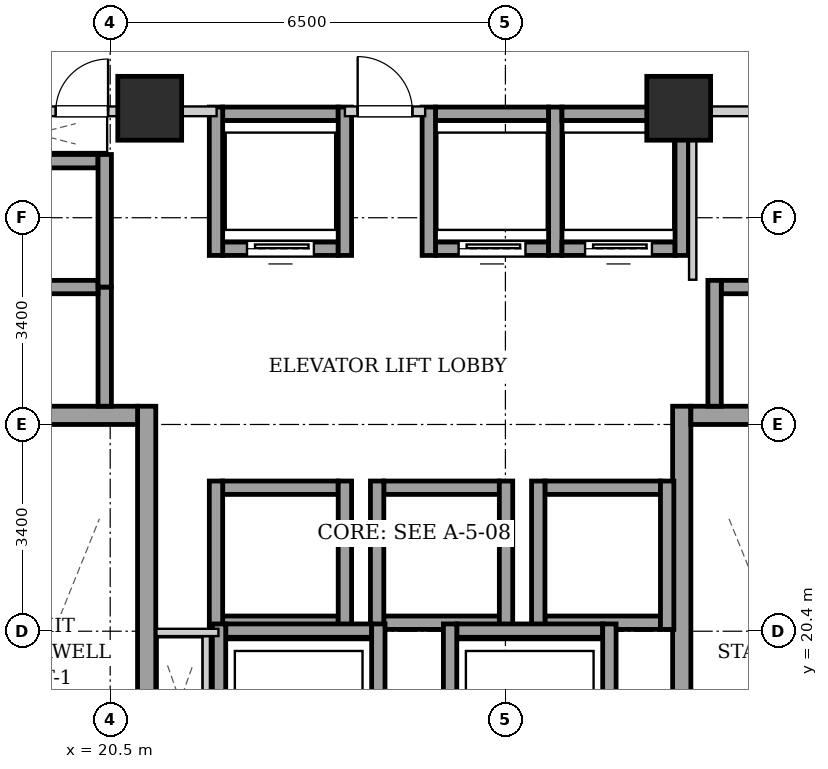
"""IFC4 building model, lengths in metres.
Left out: names, types, materials, properties, quantities, classifications, styles, units other than length and angle.
Written with IfcOpenShell. Run it as: python <this file> out.ifc"""

import sys

from ifc_helpers import new_model, si_unit, direction, frame, frame_2d, origin, origin_2d, place, context, subcontext, project, spatial, rectangle, extrude, element, fill, save


model = new_model("IFC4")
c1 = context("Model", 3, precision=1e-05, world=origin(), true_north=direction((0.0, 1.0)))
c2 = subcontext(c1, "Body", "Model", "MODEL_VIEW")
j1 = project(units=[si_unit("LENGTHUNIT", "METRE"), si_unit("PLANEANGLEUNIT", "RADIAN")], contexts=[c1])
p1 = place(None, origin())
s1 = spatial("IfcSite", under=j1, at=p1, CompositionType="ELEMENT")
p2 = place(p1, origin())
s2 = spatial("IfcBuilding", under=s1, at=p2, CompositionType="ELEMENT")
p3 = place(p2, frame((0.0, 0.0, 87.9)))
s3 = spatial("IfcBuildingStorey", under=s2, at=p3, CompositionType="ELEMENT", Elevation=87.9)
for number, where, z_axis, x_axis in (
    (1, (21.15, 29.0, 0.0), (0.0, 0.0, 1.0), (1.0, 0.0, 0.0)),
    (2, (29.85, 29.0, 0.0), (0.0, 0.0, 1.0), (1.0, 0.0, 0.0)),
):
    element("IfcColumn", number, at=place(p3, frame(where, z_axis=z_axis, x_axis=x_axis)), inside=s3, PredefinedType="COLUMN", context=c2, shape_type="SweptSolid", body=[
        extrude(rectangle(XDim=1.05, YDim=1.05, at=origin_2d()), origin(), (0.0, 0.0, 1.0), 3.2),
    ])
p4 = place(p3, frame((21.1, 15.1, 0.0), z_axis=(0.0, 0.0, 1.0), x_axis=(0.0, 1.0, 0.0)))
e3 = element("IfcWall", 3, at=p4, inside=s3, PredefinedType="SHEAR", context=c2, shape_type="SweptSolid", body=[
    extrude(rectangle(XDim=9.0, YDim=0.3, at=frame_2d((4.5, 0.0))), origin(), (0.0, 0.0, 1.0), 2.94),
])
p5 = place(p3, frame((18.1, 23.95, 0.0), z_axis=(0.0, 0.0, 1.0), x_axis=(1.0, 0.0, 0.0)))
e4 = element("IfcWall", 4, at=p5, inside=s3, PredefinedType="SHEAR", context=c2, shape_type="SweptSolid", body=[
    extrude(rectangle(XDim=2.85, YDim=0.3, at=frame_2d((1.425, 0.0))), origin(), (0.0, 0.0, 1.0), 2.94),
])
p6 = place(p3, frame((29.9, 15.1, 0.0), z_axis=(0.0, 0.0, 1.0), x_axis=(0.0, 1.0, 0.0)))
e5 = element("IfcWall", 5, at=p6, inside=s3, PredefinedType="SHEAR", context=c2, shape_type="SweptSolid", body=[
    extrude(rectangle(XDim=9.0, YDim=0.3, at=frame_2d((4.5, 0.0))), origin(), (0.0, 0.0, 1.0), 2.94),
])
p7 = place(p3, frame((30.05, 23.95, 0.0), z_axis=(0.0, 0.0, 1.0), x_axis=(1.0, 0.0, 0.0)))
e6 = element("IfcWall", 6, at=p7, inside=s3, PredefinedType="SHEAR", context=c2, shape_type="SweptSolid", body=[
    extrude(rectangle(XDim=2.85, YDim=0.3, at=frame_2d((1.425, 0.0))), origin(), (0.0, 0.0, 1.0), 2.94),
])
p8 = place(p3, frame((22.35, 26.69, 0.0), z_axis=(0.0, 0.0, 1.0), x_axis=(1.0, 0.0, 0.0)))
e7 = element("IfcWall", 7, at=p8, inside=s3, PredefinedType="SHEAR", context=c2, shape_type="SweptSolid", body=[
    extrude(rectangle(XDim=1.9, YDim=0.22, at=frame_2d((0.95, 0.0))), origin(), (0.0, 0.0, 1.0), 2.94),
])
p9 = place(p8, frame((0.4, 0.0, 0.0)))
e8 = element("IfcOpeningElement", 8, at=p9, cuts=e7, PredefinedType="OPENING", context=c2, shape_type="SweptSolid", body=[
    extrude(rectangle(XDim=1.1, YDim=2.15, at=frame_2d((0.55, 1.075))), frame((0.0, 0.12, 0.0), z_axis=(0.0, -1.0, 0.0), x_axis=(1.0, 0.0, 0.0)), (0.0, 0.0, 1.0), 0.24),
])
p10 = place(p3, frame((22.35, 28.91, 0.0), z_axis=(0.0, 0.0, 1.0), x_axis=(1.0, 0.0, 0.0)))
e9 = element("IfcWall", 9, at=p10, inside=s3, PredefinedType="SHEAR", context=c2, shape_type="SweptSolid", body=[
    extrude(rectangle(XDim=1.9, YDim=0.22, at=frame_2d((0.95, 0.0))), origin(), (0.0, 0.0, 1.0), 2.94),
])
for number, where, z_axis, x_axis in (
    (10, (22.24, 26.58, 0.0), (0.0, 0.0, 1.0), (0.0, 1.0, 0.0)),
    (11, (24.36, 26.58, 0.0), (0.0, 0.0, 1.0), (0.0, 1.0, 0.0)),
):
    element("IfcWall", number, at=place(p3, frame(where, z_axis=z_axis, x_axis=x_axis)), inside=s3, PredefinedType="SHEAR", context=c2, shape_type="SweptSolid", body=[
        extrude(rectangle(XDim=2.44, YDim=0.22, at=frame_2d((1.22, 0.0))), origin(), (0.0, 0.0, 1.0), 2.94),
    ])
p11 = place(p3, frame((25.85, 26.69, 0.0), z_axis=(0.0, 0.0, 1.0), x_axis=(1.0, 0.0, 0.0)))
e12 = element("IfcWall", 12, at=p11, inside=s3, PredefinedType="SHEAR", context=c2, shape_type="SweptSolid", body=[
    extrude(rectangle(XDim=1.86, YDim=0.22, at=frame_2d((0.93, 0.0))), origin(), (0.0, 0.0, 1.0), 2.94),
])
p12 = place(p11, frame((0.38, 0.0, 0.0)))
e13 = element("IfcOpeningElement", 13, at=p12, cuts=e12, PredefinedType="OPENING", context=c2, shape_type="SweptSolid", body=[
    extrude(rectangle(XDim=1.1, YDim=2.15, at=frame_2d((0.55, 1.075))), frame((0.0, 0.12, 0.0), z_axis=(0.0, -1.0, 0.0), x_axis=(1.0, 0.0, 0.0)), (0.0, 0.0, 1.0), 0.24),
])
p13 = place(p3, frame((25.85, 28.91, 0.0), z_axis=(0.0, 0.0, 1.0), x_axis=(1.0, 0.0, 0.0)))
e14 = element("IfcWall", 14, at=p13, inside=s3, PredefinedType="SHEAR", context=c2, shape_type="SweptSolid", body=[
    extrude(rectangle(XDim=1.86, YDim=0.22, at=frame_2d((0.93, 0.0))), origin(), (0.0, 0.0, 1.0), 2.94),
])
for number, where, z_axis, x_axis in (
    (15, (25.74, 26.58, 0.0), (0.0, 0.0, 1.0), (0.0, 1.0, 0.0)),
    (16, (27.82, 26.58, 0.0), (0.0, 0.0, 1.0), (0.0, 1.0, 0.0)),
):
    element("IfcWall", number, at=place(p3, frame(where, z_axis=z_axis, x_axis=x_axis)), inside=s3, PredefinedType="SHEAR", context=c2, shape_type="SweptSolid", body=[
        extrude(rectangle(XDim=2.44, YDim=0.22, at=frame_2d((1.22, 0.0))), origin(), (0.0, 0.0, 1.0), 2.94),
    ])
p14 = place(p3, frame((27.93, 26.69, 0.0), z_axis=(0.0, 0.0, 1.0), x_axis=(1.0, 0.0, 0.0)))
e17 = element("IfcWall", 17, at=p14, inside=s3, PredefinedType="SHEAR", context=c2, shape_type="SweptSolid", body=[
    extrude(rectangle(XDim=1.86, YDim=0.22, at=frame_2d((0.93, 0.0))), origin(), (0.0, 0.0, 1.0), 2.94),
])
p15 = place(p14, frame((0.38, 0.0, 0.0)))
e18 = element("IfcOpeningElement", 18, at=p15, cuts=e17, PredefinedType="OPENING", context=c2, shape_type="SweptSolid", body=[
    extrude(rectangle(XDim=1.1, YDim=2.15, at=frame_2d((0.55, 1.075))), frame((0.0, 0.12, 0.0), z_axis=(0.0, -1.0, 0.0), x_axis=(1.0, 0.0, 0.0)), (0.0, 0.0, 1.0), 0.24),
])
p16 = place(p3, frame((27.93, 28.91, 0.0), z_axis=(0.0, 0.0, 1.0), x_axis=(1.0, 0.0, 0.0)))
e19 = element("IfcWall", 19, at=p16, inside=s3, PredefinedType="SHEAR", context=c2, shape_type="SweptSolid", body=[
    extrude(rectangle(XDim=1.86, YDim=0.22, at=frame_2d((0.93, 0.0))), origin(), (0.0, 0.0, 1.0), 2.94),
])
p17 = place(p3, frame((29.9, 26.58, 0.0), z_axis=(0.0, 0.0, 1.0), x_axis=(0.0, 1.0, 0.0)))
e20 = element("IfcWall", 20, at=p17, inside=s3, PredefinedType="SHEAR", context=c2, shape_type="SweptSolid", body=[
    extrude(rectangle(XDim=2.44, YDim=0.22, at=frame_2d((1.22, 0.0))), origin(), (0.0, 0.0, 1.0), 2.94),
])
for number, where, z_axis, x_axis in (
    (21, (22.35, 20.54, 0.0), (0.0, 0.0, 1.0), (1.0, 0.0, 0.0)),
    (22, (22.35, 22.76, 0.0), (0.0, 0.0, 1.0), (1.0, 0.0, 0.0)),
):
    element("IfcWall", number, at=place(p3, frame(where, z_axis=z_axis, x_axis=x_axis)), inside=s3, PredefinedType="SHEAR", context=c2, shape_type="SweptSolid", body=[
        extrude(rectangle(XDim=1.9, YDim=0.22, at=frame_2d((0.95, 0.0))), origin(), (0.0, 0.0, 1.0), 2.94),
    ])
for number, where, z_axis, x_axis in (
    (23, (22.24, 20.43, 0.0), (0.0, 0.0, 1.0), (0.0, 1.0, 0.0)),
    (24, (24.36, 20.43, 0.0), (0.0, 0.0, 1.0), (0.0, 1.0, 0.0)),
):
    element("IfcWall", number, at=place(p3, frame(where, z_axis=z_axis, x_axis=x_axis)), inside=s3, PredefinedType="SHEAR", context=c2, shape_type="SweptSolid", body=[
        extrude(rectangle(XDim=2.44, YDim=0.22, at=frame_2d((1.22, 0.0))), origin(), (0.0, 0.0, 1.0), 2.94),
    ])
for number, where, z_axis, x_axis in (
    (25, (25.0, 20.54, 0.0), (0.0, 0.0, 1.0), (1.0, 0.0, 0.0)),
    (26, (25.0, 22.76, 0.0), (0.0, 0.0, 1.0), (1.0, 0.0, 0.0)),
):
    element("IfcWall", number, at=place(p3, frame(where, z_axis=z_axis, x_axis=x_axis)), inside=s3, PredefinedType="SHEAR", context=c2, shape_type="SweptSolid", body=[
        extrude(rectangle(XDim=1.9, YDim=0.22, at=frame_2d((0.95, 0.0))), origin(), (0.0, 0.0, 1.0), 2.94),
    ])
for number, where, z_axis, x_axis in (
    (27, (24.89, 20.43, 0.0), (0.0, 0.0, 1.0), (0.0, 1.0, 0.0)),
    (28, (27.01, 20.43, 0.0), (0.0, 0.0, 1.0), (0.0, 1.0, 0.0)),
):
    element("IfcWall", number, at=place(p3, frame(where, z_axis=z_axis, x_axis=x_axis)), inside=s3, PredefinedType="SHEAR", context=c2, shape_type="SweptSolid", body=[
        extrude(rectangle(XDim=2.44, YDim=0.22, at=frame_2d((1.22, 0.0))), origin(), (0.0, 0.0, 1.0), 2.94),
    ])
for number, where, z_axis, x_axis in (
    (29, (27.65, 20.54, 0.0), (0.0, 0.0, 1.0), (1.0, 0.0, 0.0)),
    (30, (27.65, 22.76, 0.0), (0.0, 0.0, 1.0), (1.0, 0.0, 0.0)),
):
    element("IfcWall", number, at=place(p3, frame(where, z_axis=z_axis, x_axis=x_axis)), inside=s3, PredefinedType="SHEAR", context=c2, shape_type="SweptSolid", body=[
        extrude(rectangle(XDim=1.9, YDim=0.22, at=frame_2d((0.95, 0.0))), origin(), (0.0, 0.0, 1.0), 2.94),
    ])
for number, where, z_axis, x_axis in (
    (31, (27.54, 20.43, 0.0), (0.0, 0.0, 1.0), (0.0, 1.0, 0.0)),
    (32, (29.66, 20.43, 0.0), (0.0, 0.0, 1.0), (0.0, 1.0, 0.0)),
):
    element("IfcWall", number, at=place(p3, frame(where, z_axis=z_axis, x_axis=x_axis)), inside=s3, PredefinedType="SHEAR", context=c2, shape_type="SweptSolid", body=[
        extrude(rectangle(XDim=2.44, YDim=0.22, at=frame_2d((1.22, 0.0))), origin(), (0.0, 0.0, 1.0), 2.94),
    ])
p18 = place(p3, frame((20.41, 24.1, 0.0), z_axis=(0.0, 0.0, 1.0), x_axis=(0.0, 1.0, 0.0)))
e33 = element("IfcWall", 33, at=p18, inside=s3, PredefinedType="SHEAR", context=c2, shape_type="SweptSolid", body=[
    extrude(rectangle(XDim=1.96, YDim=0.22, at=frame_2d((0.98, 0.0))), origin(), (0.0, 0.0, 1.0), 2.94),
])
for number, where, z_axis, x_axis in (
    (34, (18.4, 26.06, 0.0), (0.0, 0.0, 1.0), (1.0, 0.0, 0.0)),
    (35, (18.4, 28.13, 0.0), (0.0, 0.0, 1.0), (1.0, 0.0, 0.0)),
):
    element("IfcWall", number, at=place(p3, frame(where, z_axis=z_axis, x_axis=x_axis)), inside=s3, PredefinedType="SHEAR", context=c2, shape_type="SweptSolid", body=[
        extrude(rectangle(XDim=1.9, YDim=0.22, at=frame_2d((0.95, 0.0))), origin(), (0.0, 0.0, 1.0), 2.94),
    ])
p19 = place(p3, frame((20.41, 26.06, 0.0), z_axis=(0.0, 0.0, 1.0), x_axis=(0.0, 1.0, 0.0)))
e36 = element("IfcWall", 36, at=p19, inside=s3, PredefinedType="SHEAR", context=c2, shape_type="SweptSolid", body=[
    extrude(rectangle(XDim=2.18, YDim=0.22, at=frame_2d((1.09, 0.0))), origin(), (0.0, 0.0, 1.0), 2.94),
])
p20 = place(p3, frame((30.55, 26.06, 0.0), z_axis=(0.0, 0.0, 1.0), x_axis=(1.0, 0.0, 0.0)))
e37 = element("IfcWall", 37, at=p20, inside=s3, PredefinedType="SHEAR", context=c2, shape_type="SweptSolid", body=[
    extrude(rectangle(XDim=1.9, YDim=0.22, at=frame_2d((0.95, 0.0))), origin(), (0.0, 0.0, 1.0), 2.94),
])
p21 = place(p3, frame((30.44, 24.1, 0.0), z_axis=(0.0, 0.0, 1.0), x_axis=(0.0, 1.0, 0.0)))
e38 = element("IfcWall", 38, at=p21, inside=s3, PredefinedType="SHEAR", context=c2, shape_type="SweptSolid", body=[
    extrude(rectangle(XDim=2.07, YDim=0.22, at=frame_2d((1.035, 0.0))), origin(), (0.0, 0.0, 1.0), 2.94),
])
p22 = place(p3, frame((22.4, 20.41, 0.0), z_axis=(0.0, 0.0, 1.0), x_axis=(1.0, 0.0, 0.0)))
e39 = element("IfcWall", 39, at=p22, inside=s3, PredefinedType="SHEAR", context=c2, shape_type="SweptSolid", body=[
    extrude(rectangle(XDim=2.4, YDim=0.22, at=frame_2d((1.2, 0.0))), origin(), (0.0, 0.0, 1.0), 2.94),
])
for number, where, z_axis, x_axis in (
    (40, (22.29, 17.98, 0.0), (0.0, 0.0, 1.0), (0.0, 1.0, 0.0)),
    (41, (24.91, 17.98, 0.0), (0.0, 0.0, 1.0), (0.0, 1.0, 0.0)),
):
    element("IfcWall", number, at=place(p3, frame(where, z_axis=z_axis, x_axis=x_axis)), inside=s3, PredefinedType="SHEAR", context=c2, shape_type="SweptSolid", body=[
        extrude(rectangle(XDim=2.54, YDim=0.22, at=frame_2d((1.27, 0.0))), origin(), (0.0, 0.0, 1.0), 2.94),
    ])
p23 = place(p3, frame((26.2, 20.41, 0.0), z_axis=(0.0, 0.0, 1.0), x_axis=(1.0, 0.0, 0.0)))
e42 = element("IfcWall", 42, at=p23, inside=s3, PredefinedType="SHEAR", context=c2, shape_type="SweptSolid", body=[
    extrude(rectangle(XDim=2.4, YDim=0.22, at=frame_2d((1.2, 0.0))), origin(), (0.0, 0.0, 1.0), 2.94),
])
for number, where, z_axis, x_axis in (
    (43, (26.09, 17.98, 0.0), (0.0, 0.0, 1.0), (0.0, 1.0, 0.0)),
    (44, (28.71, 17.98, 0.0), (0.0, 0.0, 1.0), (0.0, 1.0, 0.0)),
):
    element("IfcWall", number, at=place(p3, frame(where, z_axis=z_axis, x_axis=x_axis)), inside=s3, PredefinedType="SHEAR", context=c2, shape_type="SweptSolid", body=[
        extrude(rectangle(XDim=2.54, YDim=0.22, at=frame_2d((1.27, 0.0))), origin(), (0.0, 0.0, 1.0), 2.94),
    ])
p24 = place(p3, frame((24.36, 28.95, 0.0), z_axis=(0.0, 0.0, 1.0), x_axis=(1.0, 0.0, 0.0)))
e45 = element("IfcWall", 45, at=p24, inside=s3, PredefinedType="PARTITIONING", context=c2, shape_type="SweptSolid", body=[
    extrude(rectangle(XDim=1.32, YDim=0.16, at=frame_2d((0.66, 0.0))), origin(), (0.0, 0.0, 1.0), 2.309),
])
p25 = place(p24, frame((0.21, 0.0, 0.0)))
e46 = element("IfcOpeningElement", 46, at=p25, cuts=e45, PredefinedType="OPENING", context=c2, shape_type="SweptSolid", body=[
    extrude(rectangle(XDim=0.9, YDim=2.05, at=frame_2d((0.45, 1.025))), frame((0.0, 0.09, 0.0), z_axis=(0.0, -1.0, 0.0), x_axis=(1.0, 0.0, 0.0)), (0.0, 0.0, 1.0), 0.18),
])
p26 = place(p3, frame((17.96, 28.95, 0.0), z_axis=(0.0, 0.0, 1.0), x_axis=(1.0, 0.0, 0.0)))
e47 = element("IfcWall", 47, at=p26, inside=s3, PredefinedType="PARTITIONING", context=c2, shape_type="SweptSolid", body=[
    extrude(rectangle(XDim=4.29, YDim=0.16, at=frame_2d((2.145, 0.0))), origin(), (0.0, 0.0, 1.0), 2.309),
])
p27 = place(p26, frame((1.645, 0.0, 0.0)))
e48 = element("IfcOpeningElement", 48, at=p27, cuts=e47, PredefinedType="OPENING", context=c2, shape_type="SweptSolid", body=[
    extrude(rectangle(XDim=0.86, YDim=2.05, at=frame_2d((0.43, 1.025))), frame((0.0, 0.09, 0.0), z_axis=(0.0, -1.0, 0.0), x_axis=(1.0, 0.0, 0.0)), (0.0, 0.0, 1.0), 0.18),
])
p28 = place(p3, frame((22.08, 18.2, 0.0), z_axis=(0.0, 0.0, 1.0), x_axis=(0.0, 1.0, 0.0)))
e49 = element("IfcWall", 49, at=p28, inside=s3, PredefinedType="PARTITIONING", context=c2, shape_type="SweptSolid", body=[
    extrude(rectangle(XDim=2.12, YDim=0.12, at=frame_2d((1.06, 0.0))), origin(), (0.0, 0.0, 1.0), 2.94),
])
p29 = place(p3, frame((22.28, 20.38, 0.0), z_axis=(0.0, 0.0, 1.0), x_axis=(-1.0, 0.0, 0.0)))
e50 = element("IfcWall", 50, at=p29, inside=s3, PredefinedType="PARTITIONING", context=c2, shape_type="SweptSolid", body=[
    extrude(rectangle(XDim=1.02, YDim=0.12, at=frame_2d((0.51, 0.0))), origin(), (0.0, 0.0, 1.0), 2.94),
])
p30 = place(p3, frame((30.08, 26.18, 0.0), z_axis=(0.0, 0.0, 1.0), x_axis=(0.0, 1.0, 0.0)))
e51 = element("IfcWall", 51, at=p30, inside=s3, PredefinedType="PARTITIONING", context=c2, shape_type="SweptSolid", body=[
    extrude(rectangle(XDim=2.68, YDim=0.12, at=frame_2d((1.34, 0.0))), origin(), (0.0, 0.0, 1.0), 2.94),
])
p31 = place(p3, frame((30.08, 28.95, 0.0), z_axis=(0.0, 0.0, 1.0), x_axis=(1.0, 0.0, 0.0)))
e52 = element("IfcWall", 52, at=p31, inside=s3, PredefinedType="PARTITIONING", context=c2, shape_type="SweptSolid", body=[
    extrude(rectangle(XDim=2.96, YDim=0.16, at=frame_2d((1.48, 0.0))), origin(), (0.0, 0.0, 1.0), 2.94),
])
p32 = place(p31, frame((1.045, 0.0, 0.0)))
e53 = element("IfcOpeningElement", 53, at=p32, cuts=e52, PredefinedType="OPENING", context=c2, shape_type="SweptSolid", body=[
    extrude(rectangle(XDim=0.86, YDim=2.05, at=frame_2d((0.43, 1.025))), frame((0.0, 0.09, 0.0), z_axis=(0.0, -1.0, 0.0), x_axis=(1.0, 0.0, 0.0)), (0.0, 0.0, 1.0), 0.18),
])
p33 = place(p9, origin())
e54 = element("IfcDoor", 54, at=p33, inside=s3, OperationType="SLIDING_TO_LEFT", PredefinedType="DOOR", context=c2, shape_type="SweptSolid", body=[
    extrude(rectangle(XDim=1.1, YDim=2.15, at=frame_2d((0.55, 1.075))), frame((0.0, 0.025, 0.0), z_axis=(0.0, -1.0, 0.0), x_axis=(1.0, 0.0, 0.0)), (0.0, 0.0, 1.0), 0.05),
])
fill(e8, e54)
p34 = place(p12, origin())
e55 = element("IfcDoor", 55, at=p34, inside=s3, OperationType="SLIDING_TO_LEFT", PredefinedType="DOOR", context=c2, shape_type="SweptSolid", body=[
    extrude(rectangle(XDim=1.1, YDim=2.15, at=frame_2d((0.55, 1.075))), frame((0.0, 0.025, 0.0), z_axis=(0.0, -1.0, 0.0), x_axis=(1.0, 0.0, 0.0)), (0.0, 0.0, 1.0), 0.05),
])
fill(e13, e55)
p35 = place(p15, origin())
e56 = element("IfcDoor", 56, at=p35, inside=s3, OperationType="SLIDING_TO_LEFT", PredefinedType="DOOR", context=c2, shape_type="SweptSolid", body=[
    extrude(rectangle(XDim=1.1, YDim=2.15, at=frame_2d((0.55, 1.075))), frame((0.0, 0.025, 0.0), z_axis=(0.0, -1.0, 0.0), x_axis=(1.0, 0.0, 0.0)), (0.0, 0.0, 1.0), 0.05),
])
fill(e18, e56)
p36 = place(p25, origin())
e57 = element("IfcDoor", 57, at=p36, inside=s3, OperationType="SINGLE_SWING_LEFT", PredefinedType="DOOR", context=c2, shape_type="SweptSolid", body=[
    extrude(rectangle(XDim=0.9, YDim=2.05, at=frame_2d((0.45, 1.025))), frame((0.0, 0.025, 0.0), z_axis=(0.0, -1.0, 0.0), x_axis=(1.0, 0.0, 0.0)), (0.0, 0.0, 1.0), 0.05),
])
fill(e46, e57)
p37 = place(p27, origin())
e58 = element("IfcDoor", 58, at=p37, inside=s3, OperationType="SINGLE_SWING_RIGHT", PredefinedType="DOOR", context=c2, shape_type="SweptSolid", body=[
    extrude(rectangle(XDim=0.86, YDim=2.05, at=frame_2d((0.43, 1.025))), frame((0.0, 0.025, 0.0), z_axis=(0.0, -1.0, 0.0), x_axis=(1.0, 0.0, 0.0)), (0.0, 0.0, 1.0), 0.05),
])
fill(e48, e58)
save(model, sys.argv[1])
